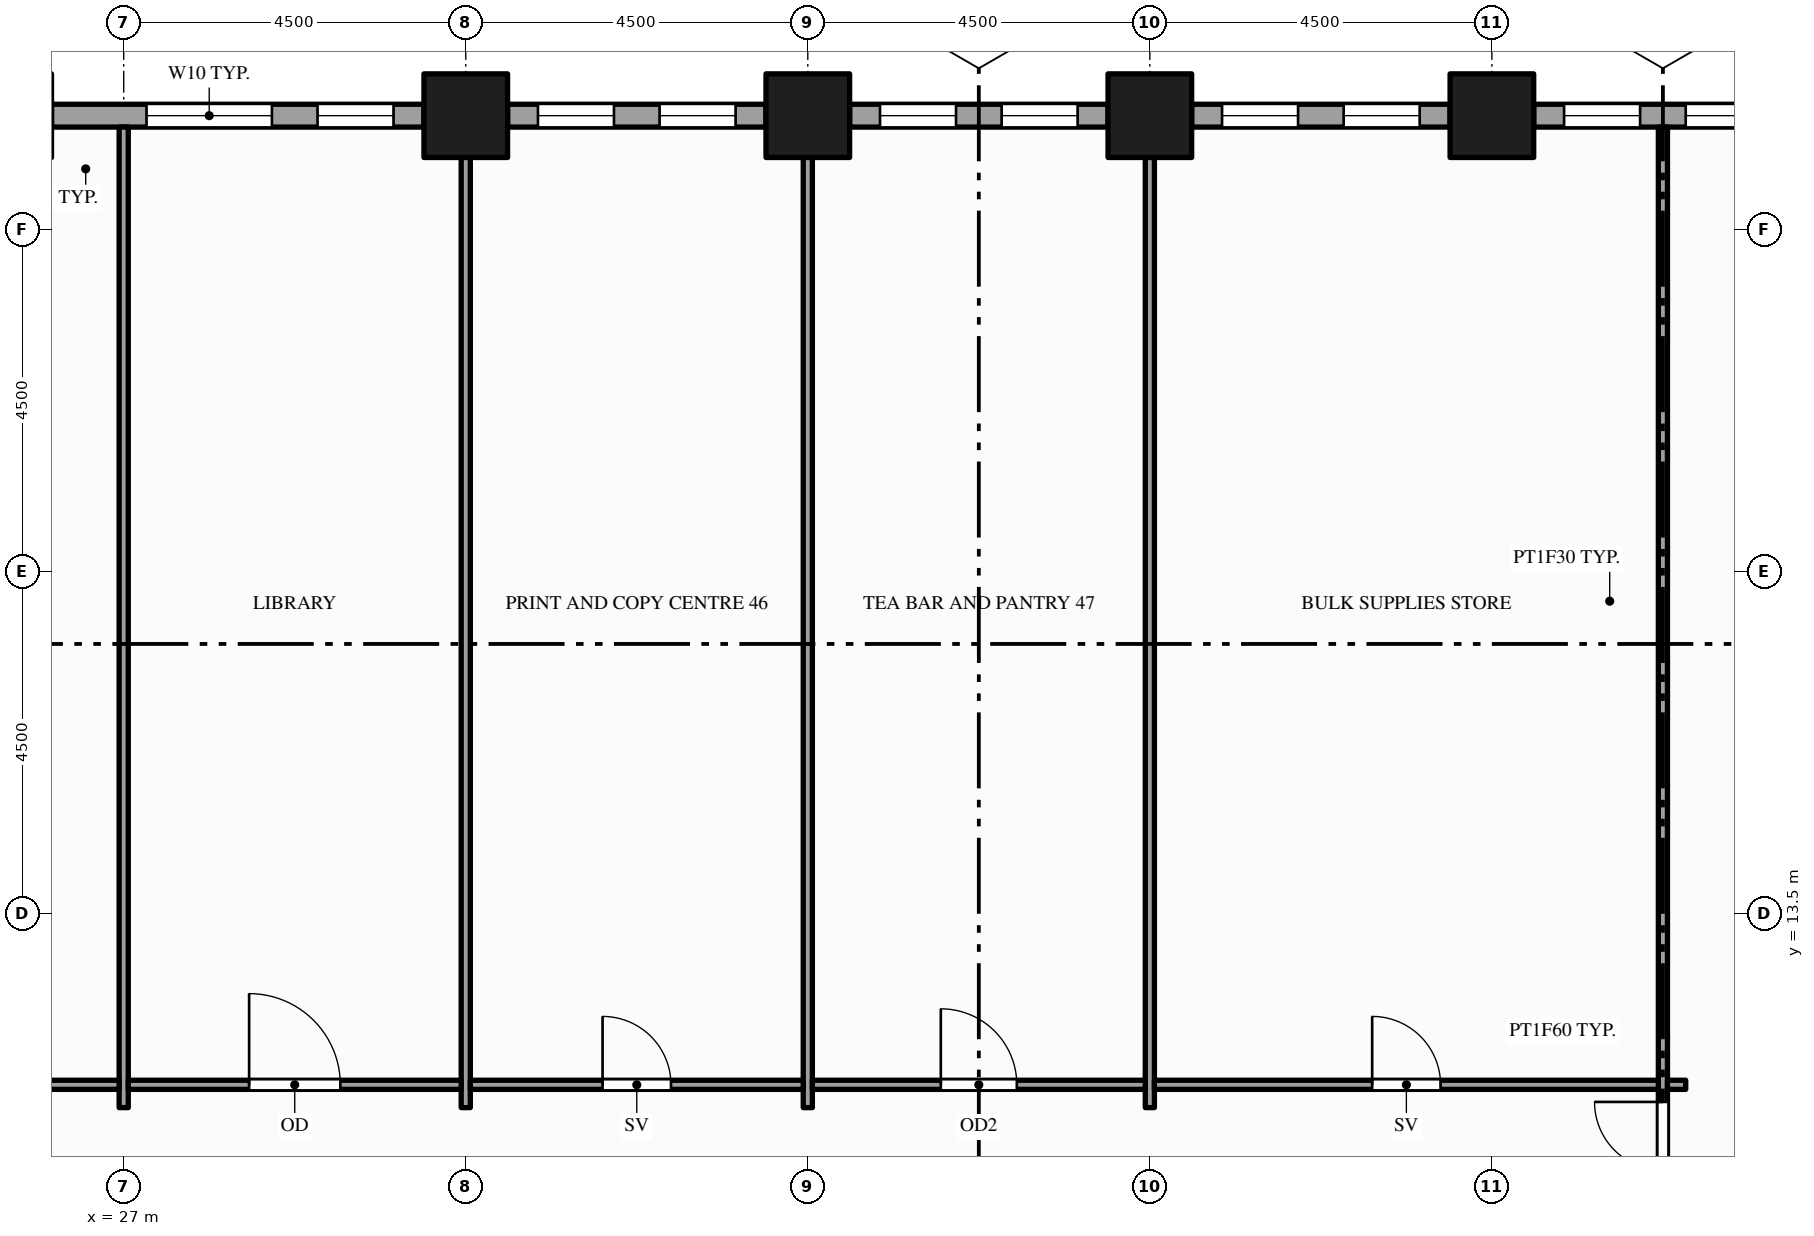
"""IFC4 building model, lengths in metres.
Left out: names, types, materials, properties, quantities, classifications, styles, units other than length and angle.
Written with IfcOpenShell. Run it as: python <this file> out.ifc"""

import sys

from ifc_helpers import new_model, si_unit, direction, frame, frame_2d, origin, origin_2d, place, context, subcontext, project, spatial, rectangle, hollow_rectangle, extrude, element, fill, save


model = new_model("IFC4")
c1 = context("Model", 3, precision=1e-05, world=origin(), true_north=direction((0.0, 1.0)))
c2 = subcontext(c1, "Body", "Model", "MODEL_VIEW")
j1 = project(units=[si_unit("LENGTHUNIT", "METRE"), si_unit("PLANEANGLEUNIT", "RADIAN")], contexts=[c1])
p1 = place(None, origin())
s1 = spatial("IfcSite", under=j1, at=p1, CompositionType="ELEMENT")
p2 = place(p1, origin())
s2 = spatial("IfcBuilding", under=s1, at=p2, CompositionType="ELEMENT")
p3 = place(p2, frame((0.0, 0.0, 69.0)))
s3 = spatial("IfcBuildingStorey", under=s2, at=p3, CompositionType="ELEMENT", Elevation=69.0)
for number, where, z_axis, x_axis in (
    (1, (31.5, 24.0, -0.15), (0.0, 0.0, 1.0), (1.0, 0.0, 0.0)),
    (2, (36.0, 24.0, -0.15), (0.0, 0.0, 1.0), (1.0, 0.0, 0.0)),
    (3, (40.5, 24.0, -0.15), (0.0, 0.0, 1.0), (1.0, 0.0, 0.0)),
    (4, (45.0, 24.0, -0.15), (0.0, 0.0, 1.0), (1.0, 0.0, 0.0)),
):
    element("IfcColumn", number, at=place(p3, frame(where, z_axis=z_axis, x_axis=x_axis)), inside=s3, PredefinedType="COLUMN", context=c2, shape_type="SweptSolid", body=[
        extrude(hollow_rectangle(XDim=1.1, YDim=1.1, WallThickness=0.06, at=origin_2d()), origin(), (0.0, 0.0, 1.0), 4.0),
    ])
p4 = place(p3, frame((48.95, 24.0, 0.0), z_axis=(0.0, 0.0, 1.0), x_axis=(-1.0, 0.0, 0.0)))
e5 = element("IfcWall", 5, at=p4, inside=s3, PredefinedType="STANDARD", context=c2, shape_type="SweptSolid", body=[
    extrude(rectangle(XDim=3.4, YDim=0.3, at=frame_2d((1.7, 0.0))), origin(), (0.0, 0.0, 1.0), 3.144),
])
p5 = place(p4, frame((0.4, 0.0, 0.9)))
e6 = element("IfcOpeningElement", 6, at=p5, cuts=e5, PredefinedType="OPENING", context=c2, shape_type="SweptSolid", body=[
    extrude(rectangle(XDim=1.0, YDim=2.0, at=frame_2d((0.5, 1.0))), frame((0.0, 0.16, 0.0), z_axis=(0.0, -1.0, 0.0), x_axis=(1.0, 0.0, 0.0)), (0.0, 0.0, 1.0), 0.32),
])
p6 = place(p4, frame((2.0, 0.0, 0.9)))
e7 = element("IfcOpeningElement", 7, at=p6, cuts=e5, PredefinedType="OPENING", context=c2, shape_type="SweptSolid", body=[
    extrude(rectangle(XDim=1.0, YDim=2.0, at=frame_2d((0.5, 1.0))), frame((0.0, 0.16, 0.0), z_axis=(0.0, -1.0, 0.0), x_axis=(1.0, 0.0, 0.0)), (0.0, 0.0, 1.0), 0.32),
])
p7 = place(p3, frame((44.45, 24.0, 0.0), z_axis=(0.0, 0.0, 1.0), x_axis=(-1.0, 0.0, 0.0)))
e8 = element("IfcWall", 8, at=p7, inside=s3, PredefinedType="STANDARD", context=c2, shape_type="SweptSolid", body=[
    extrude(rectangle(XDim=3.4, YDim=0.3, at=frame_2d((1.7, 0.0))), origin(), (0.0, 0.0, 1.0), 3.144),
])
p8 = place(p7, frame((0.4, 0.0, 0.9)))
e9 = element("IfcOpeningElement", 9, at=p8, cuts=e8, PredefinedType="OPENING", context=c2, shape_type="SweptSolid", body=[
    extrude(rectangle(XDim=1.0, YDim=2.0, at=frame_2d((0.5, 1.0))), frame((0.0, 0.16, 0.0), z_axis=(0.0, -1.0, 0.0), x_axis=(1.0, 0.0, 0.0)), (0.0, 0.0, 1.0), 0.32),
])
p9 = place(p7, frame((2.0, 0.0, 0.9)))
e10 = element("IfcOpeningElement", 10, at=p9, cuts=e8, PredefinedType="OPENING", context=c2, shape_type="SweptSolid", body=[
    extrude(rectangle(XDim=1.0, YDim=2.0, at=frame_2d((0.5, 1.0))), frame((0.0, 0.16, 0.0), z_axis=(0.0, -1.0, 0.0), x_axis=(1.0, 0.0, 0.0)), (0.0, 0.0, 1.0), 0.32),
])
p10 = place(p3, frame((39.95, 24.0, 0.0), z_axis=(0.0, 0.0, 1.0), x_axis=(-1.0, 0.0, 0.0)))
e11 = element("IfcWall", 11, at=p10, inside=s3, PredefinedType="STANDARD", context=c2, shape_type="SweptSolid", body=[
    extrude(rectangle(XDim=3.4, YDim=0.3, at=frame_2d((1.7, 0.0))), origin(), (0.0, 0.0, 1.0), 3.144),
])
p11 = place(p10, frame((0.4, 0.0, 0.9)))
e12 = element("IfcOpeningElement", 12, at=p11, cuts=e11, PredefinedType="OPENING", context=c2, shape_type="SweptSolid", body=[
    extrude(rectangle(XDim=1.0, YDim=2.0, at=frame_2d((0.5, 1.0))), frame((0.0, 0.16, 0.0), z_axis=(0.0, -1.0, 0.0), x_axis=(1.0, 0.0, 0.0)), (0.0, 0.0, 1.0), 0.32),
])
p12 = place(p10, frame((2.0, 0.0, 0.9)))
e13 = element("IfcOpeningElement", 13, at=p12, cuts=e11, PredefinedType="OPENING", context=c2, shape_type="SweptSolid", body=[
    extrude(rectangle(XDim=1.0, YDim=2.0, at=frame_2d((0.5, 1.0))), frame((0.0, 0.16, 0.0), z_axis=(0.0, -1.0, 0.0), x_axis=(1.0, 0.0, 0.0)), (0.0, 0.0, 1.0), 0.32),
])
p13 = place(p3, frame((35.45, 24.0, 0.0), z_axis=(0.0, 0.0, 1.0), x_axis=(-1.0, 0.0, 0.0)))
e14 = element("IfcWall", 14, at=p13, inside=s3, PredefinedType="STANDARD", context=c2, shape_type="SweptSolid", body=[
    extrude(rectangle(XDim=3.4, YDim=0.3, at=frame_2d((1.7, 0.0))), origin(), (0.0, 0.0, 1.0), 3.144),
])
p14 = place(p13, frame((0.4, 0.0, 0.9)))
e15 = element("IfcOpeningElement", 15, at=p14, cuts=e14, PredefinedType="OPENING", context=c2, shape_type="SweptSolid", body=[
    extrude(rectangle(XDim=1.0, YDim=2.0, at=frame_2d((0.5, 1.0))), frame((0.0, 0.16, 0.0), z_axis=(0.0, -1.0, 0.0), x_axis=(1.0, 0.0, 0.0)), (0.0, 0.0, 1.0), 0.32),
])
p15 = place(p13, frame((2.0, 0.0, 0.9)))
e16 = element("IfcOpeningElement", 16, at=p15, cuts=e14, PredefinedType="OPENING", context=c2, shape_type="SweptSolid", body=[
    extrude(rectangle(XDim=1.0, YDim=2.0, at=frame_2d((0.5, 1.0))), frame((0.0, 0.16, 0.0), z_axis=(0.0, -1.0, 0.0), x_axis=(1.0, 0.0, 0.0)), (0.0, 0.0, 1.0), 0.32),
])
p16 = place(p3, frame((30.95, 24.0, 0.0), z_axis=(0.0, 0.0, 1.0), x_axis=(-1.0, 0.0, 0.0)))
e17 = element("IfcWall", 17, at=p16, inside=s3, PredefinedType="STANDARD", context=c2, shape_type="SweptSolid", body=[
    extrude(rectangle(XDim=4.9, YDim=0.3, at=frame_2d((2.45, 0.0))), origin(), (0.0, 0.0, 1.0), 3.144),
])
p17 = place(p16, frame((0.4, 0.0, 0.9)))
e18 = element("IfcOpeningElement", 18, at=p17, cuts=e17, PredefinedType="OPENING", context=c2, shape_type="SweptSolid", body=[
    extrude(rectangle(XDim=1.0, YDim=2.0, at=frame_2d((0.5, 1.0))), frame((0.0, 0.16, 0.0), z_axis=(0.0, -1.0, 0.0), x_axis=(1.0, 0.0, 0.0)), (0.0, 0.0, 1.0), 0.32),
])
p18 = place(p16, frame((2.0, 0.0, 0.9)))
e19 = element("IfcOpeningElement", 19, at=p18, cuts=e17, PredefinedType="OPENING", context=c2, shape_type="SweptSolid", body=[
    extrude(rectangle(XDim=1.65, YDim=2.0, at=frame_2d((0.825, 1.0))), frame((0.0, 0.16, 0.0), z_axis=(0.0, -1.0, 0.0), x_axis=(1.0, 0.0, 0.0)), (0.0, 0.0, 1.0), 0.32),
])
for number, where, z_axis, x_axis in (
    (20, (27.0, 10.95, 0.0), (0.0, 0.0, 1.0), (0.0, 1.0, 0.0)),
    (21, (31.5, 10.95, 0.0), (0.0, 0.0, 1.0), (0.0, 1.0, 0.0)),
    (22, (36.0, 10.95, 0.0), (0.0, 0.0, 1.0), (0.0, 1.0, 0.0)),
    (23, (40.5, 10.95, 0.0), (0.0, 0.0, 1.0), (0.0, 1.0, 0.0)),
):
    element("IfcWall", number, at=place(p3, frame(where, z_axis=z_axis, x_axis=x_axis)), inside=s3, PredefinedType="PARTITIONING", context=c2, shape_type="SweptSolid", body=[
        extrude(rectangle(XDim=12.9, YDim=0.12, at=frame_2d((6.45, 0.0))), origin(), (0.0, 0.0, 1.0), 2.938),
    ])
p19 = place(p3, frame((47.25, 1.65, 0.0), z_axis=(0.0, 0.0, 1.0), x_axis=(0.0, 1.0, 0.0)))
e24 = element("IfcWall", 24, at=p19, inside=s3, PredefinedType="PARTITIONING", context=c2, shape_type="SweptSolid", body=[
    extrude(rectangle(XDim=22.2, YDim=0.12, at=frame_2d((11.1, 0.0))), origin(), (0.0, 0.0, 1.0), 2.938),
])
p20 = place(p19, frame((7.575, 0.0, 0.0)))
e25 = element("IfcOpeningElement", 25, at=p20, cuts=e24, PredefinedType="OPENING", context=c2, shape_type="SweptSolid", body=[
    extrude(rectangle(XDim=1.8, YDim=2.1, at=frame_2d((0.9, 1.05))), frame((0.0, 0.07, 0.0), z_axis=(0.0, -1.0, 0.0), x_axis=(1.0, 0.0, 0.0)), (0.0, 0.0, 1.0), 0.14),
])
p21 = place(p19, frame((0.85, 0.0, 0.0)))
e26 = element("IfcOpeningElement", 26, at=p21, cuts=e24, PredefinedType="OPENING", context=c2, shape_type="SweptSolid", body=[
    extrude(rectangle(XDim=0.9, YDim=2.1, at=frame_2d((0.45, 1.05))), frame((0.0, 0.07, 0.0), z_axis=(0.0, -1.0, 0.0), x_axis=(1.0, 0.0, 0.0)), (0.0, 0.0, 1.0), 0.14),
])
p22 = place(p19, frame((3.15, 0.0, 0.0)))
e27 = element("IfcOpeningElement", 27, at=p22, cuts=e24, PredefinedType="OPENING", context=c2, shape_type="SweptSolid", body=[
    extrude(rectangle(XDim=0.9, YDim=2.1, at=frame_2d((0.45, 1.05))), frame((0.0, 0.07, 0.0), z_axis=(0.0, -1.0, 0.0), x_axis=(1.0, 0.0, 0.0)), (0.0, 0.0, 1.0), 0.14),
])
p23 = place(p19, frame((5.35, 0.0, 0.0)))
e28 = element("IfcOpeningElement", 28, at=p23, cuts=e24, PredefinedType="OPENING", context=c2, shape_type="SweptSolid", body=[
    extrude(rectangle(XDim=1.0, YDim=2.1, at=frame_2d((0.5, 1.05))), frame((0.0, 0.07, 0.0), z_axis=(0.0, -1.0, 0.0), x_axis=(1.0, 0.0, 0.0)), (0.0, 0.0, 1.0), 0.14),
])
p24 = place(p3, frame((11.31, 11.25, 0.0), z_axis=(0.0, 0.0, 1.0), x_axis=(1.0, 0.0, 0.0)))
e29 = element("IfcWall", 29, at=p24, inside=s3, PredefinedType="PARTITIONING", context=c2, shape_type="SweptSolid", body=[
    extrude(rectangle(XDim=15.63, YDim=0.12, at=frame_2d((7.815, 0.0))), origin(), (0.0, 0.0, 1.0), 2.938),
])
p25 = place(p24, frame((3.54, 0.0, 0.0)))
e30 = element("IfcOpeningElement", 30, at=p25, cuts=e29, PredefinedType="OPENING", context=c2, shape_type="SweptSolid", body=[
    extrude(rectangle(XDim=1.8, YDim=2.1, at=frame_2d((0.9, 1.05))), frame((0.0, 0.07, 0.0), z_axis=(0.0, -1.0, 0.0), x_axis=(1.0, 0.0, 0.0)), (0.0, 0.0, 1.0), 0.14),
])
p26 = place(p3, frame((27.06, 11.25, 0.0), z_axis=(0.0, 0.0, 1.0), x_axis=(1.0, 0.0, 0.0)))
e31 = element("IfcWall", 31, at=p26, inside=s3, PredefinedType="PARTITIONING", context=c2, shape_type="SweptSolid", body=[
    extrude(rectangle(XDim=4.38, YDim=0.12, at=frame_2d((2.19, 0.0))), origin(), (0.0, 0.0, 1.0), 2.938),
])
p27 = place(p26, frame((1.59, 0.0, 0.0)))
e32 = element("IfcOpeningElement", 32, at=p27, cuts=e31, PredefinedType="OPENING", context=c2, shape_type="SweptSolid", body=[
    extrude(rectangle(XDim=1.2, YDim=2.1, at=frame_2d((0.6, 1.05))), frame((0.0, 0.07, 0.0), z_axis=(0.0, -1.0, 0.0), x_axis=(1.0, 0.0, 0.0)), (0.0, 0.0, 1.0), 0.14),
])
p28 = place(p3, frame((31.56, 11.25, 0.0), z_axis=(0.0, 0.0, 1.0), x_axis=(1.0, 0.0, 0.0)))
e33 = element("IfcWall", 33, at=p28, inside=s3, PredefinedType="PARTITIONING", context=c2, shape_type="SweptSolid", body=[
    extrude(rectangle(XDim=4.38, YDim=0.12, at=frame_2d((2.19, 0.0))), origin(), (0.0, 0.0, 1.0), 2.938),
])
p29 = place(p28, frame((1.74, 0.0, 0.0)))
e34 = element("IfcOpeningElement", 34, at=p29, cuts=e33, PredefinedType="OPENING", context=c2, shape_type="SweptSolid", body=[
    extrude(rectangle(XDim=0.9, YDim=2.1, at=frame_2d((0.45, 1.05))), frame((0.0, 0.07, 0.0), z_axis=(0.0, -1.0, 0.0), x_axis=(1.0, 0.0, 0.0)), (0.0, 0.0, 1.0), 0.14),
])
p30 = place(p3, frame((36.06, 11.25, 0.0), z_axis=(0.0, 0.0, 1.0), x_axis=(1.0, 0.0, 0.0)))
e35 = element("IfcWall", 35, at=p30, inside=s3, PredefinedType="PARTITIONING", context=c2, shape_type="SweptSolid", body=[
    extrude(rectangle(XDim=4.38, YDim=0.12, at=frame_2d((2.19, 0.0))), origin(), (0.0, 0.0, 1.0), 2.938),
])
p31 = place(p30, frame((1.69, 0.0, 0.0)))
e36 = element("IfcOpeningElement", 36, at=p31, cuts=e35, PredefinedType="OPENING", context=c2, shape_type="SweptSolid", body=[
    extrude(rectangle(XDim=1.0, YDim=2.1, at=frame_2d((0.5, 1.05))), frame((0.0, 0.07, 0.0), z_axis=(0.0, -1.0, 0.0), x_axis=(1.0, 0.0, 0.0)), (0.0, 0.0, 1.0), 0.14),
])
p32 = place(p3, frame((40.56, 11.25, 0.0), z_axis=(0.0, 0.0, 1.0), x_axis=(1.0, 0.0, 0.0)))
e37 = element("IfcWall", 37, at=p32, inside=s3, PredefinedType="PARTITIONING", context=c2, shape_type="SweptSolid", body=[
    extrude(rectangle(XDim=6.63, YDim=0.12, at=frame_2d((3.315, 0.0))), origin(), (0.0, 0.0, 1.0), 2.938),
])
p33 = place(p32, frame((2.865, 0.0, 0.0)))
e38 = element("IfcOpeningElement", 38, at=p33, cuts=e37, PredefinedType="OPENING", context=c2, shape_type="SweptSolid", body=[
    extrude(rectangle(XDim=0.9, YDim=2.1, at=frame_2d((0.45, 1.05))), frame((0.0, 0.07, 0.0), z_axis=(0.0, -1.0, 0.0), x_axis=(1.0, 0.0, 0.0)), (0.0, 0.0, 1.0), 0.14),
])
p34 = place(p3, frame((47.31, 11.25, 0.0), z_axis=(0.0, 0.0, 1.0), x_axis=(1.0, 0.0, 0.0)))
e39 = element("IfcWall", 39, at=p34, inside=s3, PredefinedType="PARTITIONING", context=c2, shape_type="SweptSolid", body=[
    extrude(rectangle(XDim=0.24, YDim=0.12, at=frame_2d((0.12, 0.0))), origin(), (0.0, 0.0, 1.0), 2.938),
])
p35 = place(p5, origin())
e40 = element("IfcWindow", 40, at=p35, inside=s3, PartitioningType="SINGLE_PANEL", PredefinedType="WINDOW", context=c2, shape_type="SweptSolid", body=[
    extrude(rectangle(XDim=1.0, YDim=2.0, at=frame_2d((0.5, 1.0))), frame((0.0, 0.03, 0.0), z_axis=(0.0, -1.0, 0.0), x_axis=(1.0, 0.0, 0.0)), (0.0, 0.0, 1.0), 0.06),
])
fill(e6, e40)
p36 = place(p6, origin())
e41 = element("IfcWindow", 41, at=p36, inside=s3, PartitioningType="SINGLE_PANEL", PredefinedType="WINDOW", context=c2, shape_type="SweptSolid", body=[
    extrude(rectangle(XDim=1.0, YDim=2.0, at=frame_2d((0.5, 1.0))), frame((0.0, 0.03, 0.0), z_axis=(0.0, -1.0, 0.0), x_axis=(1.0, 0.0, 0.0)), (0.0, 0.0, 1.0), 0.06),
])
fill(e7, e41)
p37 = place(p8, origin())
e42 = element("IfcWindow", 42, at=p37, inside=s3, PartitioningType="SINGLE_PANEL", PredefinedType="WINDOW", context=c2, shape_type="SweptSolid", body=[
    extrude(rectangle(XDim=1.0, YDim=2.0, at=frame_2d((0.5, 1.0))), frame((0.0, 0.03, 0.0), z_axis=(0.0, -1.0, 0.0), x_axis=(1.0, 0.0, 0.0)), (0.0, 0.0, 1.0), 0.06),
])
fill(e9, e42)
p38 = place(p9, origin())
e43 = element("IfcWindow", 43, at=p38, inside=s3, PartitioningType="SINGLE_PANEL", PredefinedType="WINDOW", context=c2, shape_type="SweptSolid", body=[
    extrude(rectangle(XDim=1.0, YDim=2.0, at=frame_2d((0.5, 1.0))), frame((0.0, 0.03, 0.0), z_axis=(0.0, -1.0, 0.0), x_axis=(1.0, 0.0, 0.0)), (0.0, 0.0, 1.0), 0.06),
])
fill(e10, e43)
p39 = place(p11, origin())
e44 = element("IfcWindow", 44, at=p39, inside=s3, PartitioningType="SINGLE_PANEL", PredefinedType="WINDOW", context=c2, shape_type="SweptSolid", body=[
    extrude(rectangle(XDim=1.0, YDim=2.0, at=frame_2d((0.5, 1.0))), frame((0.0, 0.03, 0.0), z_axis=(0.0, -1.0, 0.0), x_axis=(1.0, 0.0, 0.0)), (0.0, 0.0, 1.0), 0.06),
])
fill(e12, e44)
p40 = place(p12, origin())
e45 = element("IfcWindow", 45, at=p40, inside=s3, PartitioningType="SINGLE_PANEL", PredefinedType="WINDOW", context=c2, shape_type="SweptSolid", body=[
    extrude(rectangle(XDim=1.0, YDim=2.0, at=frame_2d((0.5, 1.0))), frame((0.0, 0.03, 0.0), z_axis=(0.0, -1.0, 0.0), x_axis=(1.0, 0.0, 0.0)), (0.0, 0.0, 1.0), 0.06),
])
fill(e13, e45)
p41 = place(p14, origin())
e46 = element("IfcWindow", 46, at=p41, inside=s3, PartitioningType="SINGLE_PANEL", PredefinedType="WINDOW", context=c2, shape_type="SweptSolid", body=[
    extrude(rectangle(XDim=1.0, YDim=2.0, at=frame_2d((0.5, 1.0))), frame((0.0, 0.03, 0.0), z_axis=(0.0, -1.0, 0.0), x_axis=(1.0, 0.0, 0.0)), (0.0, 0.0, 1.0), 0.06),
])
fill(e15, e46)
p42 = place(p15, origin())
e47 = element("IfcWindow", 47, at=p42, inside=s3, PartitioningType="SINGLE_PANEL", PredefinedType="WINDOW", context=c2, shape_type="SweptSolid", body=[
    extrude(rectangle(XDim=1.0, YDim=2.0, at=frame_2d((0.5, 1.0))), frame((0.0, 0.03, 0.0), z_axis=(0.0, -1.0, 0.0), x_axis=(1.0, 0.0, 0.0)), (0.0, 0.0, 1.0), 0.06),
])
fill(e16, e47)
p43 = place(p17, origin())
e48 = element("IfcWindow", 48, at=p43, inside=s3, PartitioningType="SINGLE_PANEL", PredefinedType="WINDOW", context=c2, shape_type="SweptSolid", body=[
    extrude(rectangle(XDim=1.0, YDim=2.0, at=frame_2d((0.5, 1.0))), frame((0.0, 0.03, 0.0), z_axis=(0.0, -1.0, 0.0), x_axis=(1.0, 0.0, 0.0)), (0.0, 0.0, 1.0), 0.06),
])
fill(e18, e48)
p44 = place(p18, origin())
e49 = element("IfcWindow", 49, at=p44, inside=s3, PartitioningType="SINGLE_PANEL", PredefinedType="WINDOW", context=c2, shape_type="SweptSolid", body=[
    extrude(rectangle(XDim=1.65, YDim=2.0, at=frame_2d((0.825, 1.0))), frame((0.0, 0.03, 0.0), z_axis=(0.0, -1.0, 0.0), x_axis=(1.0, 0.0, 0.0)), (0.0, 0.0, 1.0), 0.06),
])
fill(e19, e49)
p45 = place(p20, origin())
e50 = element("IfcDoor", 50, at=p45, inside=s3, OperationType="DOUBLE_DOOR_SINGLE_SWING", PredefinedType="DOOR", context=c2, shape_type="SweptSolid", body=[
    extrude(rectangle(XDim=1.8, YDim=2.1, at=frame_2d((0.9, 1.05))), frame((0.0, 0.025, 0.0), z_axis=(0.0, -1.0, 0.0), x_axis=(1.0, 0.0, 0.0)), (0.0, 0.0, 1.0), 0.05),
])
fill(e25, e50)
p46 = place(p27, origin())
e51 = element("IfcDoor", 51, at=p46, inside=s3, OperationType="SINGLE_SWING_LEFT", PredefinedType="DOOR", context=c2, shape_type="SweptSolid", body=[
    extrude(rectangle(XDim=1.2, YDim=2.1, at=frame_2d((0.6, 1.05))), frame((0.0, 0.025, 0.0), z_axis=(0.0, -1.0, 0.0), x_axis=(1.0, 0.0, 0.0)), (0.0, 0.0, 1.0), 0.05),
])
fill(e32, e51)
p47 = place(p29, origin())
e52 = element("IfcDoor", 52, at=p47, inside=s3, OperationType="SINGLE_SWING_LEFT", PredefinedType="DOOR", context=c2, shape_type="SweptSolid", body=[
    extrude(rectangle(XDim=0.9, YDim=2.1, at=frame_2d((0.45, 1.05))), frame((0.0, 0.025, 0.0), z_axis=(0.0, -1.0, 0.0), x_axis=(1.0, 0.0, 0.0)), (0.0, 0.0, 1.0), 0.05),
])
fill(e34, e52)
p48 = place(p31, origin())
e53 = element("IfcDoor", 53, at=p48, inside=s3, OperationType="SINGLE_SWING_LEFT", PredefinedType="DOOR", context=c2, shape_type="SweptSolid", body=[
    extrude(rectangle(XDim=1.0, YDim=2.1, at=frame_2d((0.5, 1.05))), frame((0.0, 0.025, 0.0), z_axis=(0.0, -1.0, 0.0), x_axis=(1.0, 0.0, 0.0)), (0.0, 0.0, 1.0), 0.05),
])
fill(e36, e53)
p49 = place(p33, origin())
e54 = element("IfcDoor", 54, at=p49, inside=s3, OperationType="SINGLE_SWING_LEFT", PredefinedType="DOOR", context=c2, shape_type="SweptSolid", body=[
    extrude(rectangle(XDim=0.9, YDim=2.1, at=frame_2d((0.45, 1.05))), frame((0.0, 0.025, 0.0), z_axis=(0.0, -1.0, 0.0), x_axis=(1.0, 0.0, 0.0)), (0.0, 0.0, 1.0), 0.05),
])
fill(e38, e54)
save(model, sys.argv[1])
